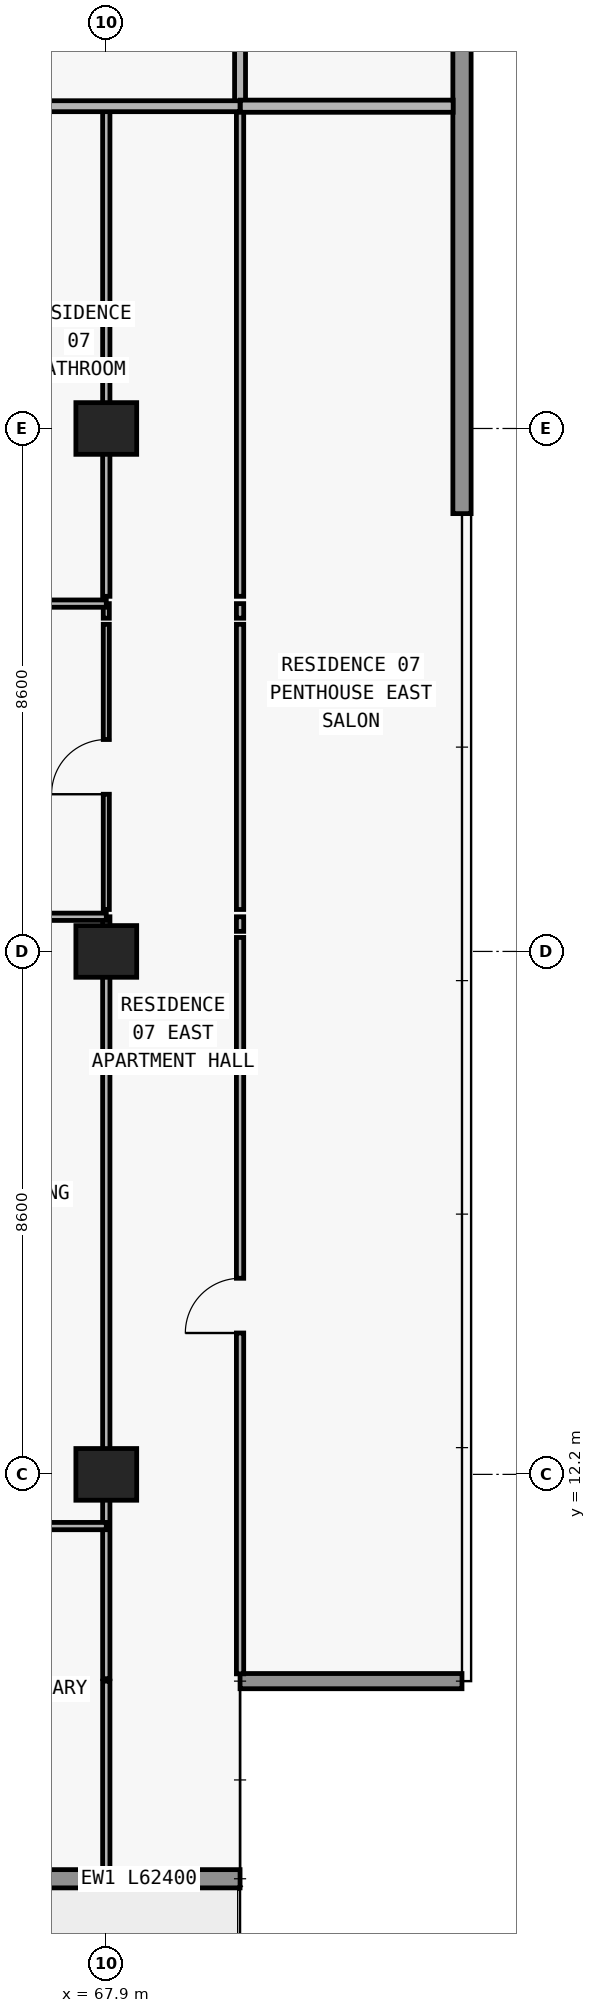
"""IFC4 building model, lengths in metres.
Left out: names, types, materials, properties, quantities, classifications, styles, units other than length and angle.
Written with IfcOpenShell. Run it as: python <this file> out.ifc"""

import sys

from ifc_helpers import new_model, si_unit, direction, frame, frame_2d, origin, origin_2d, place, context, subcontext, project, spatial, rectangle, extrude, element, fill, save


model = new_model("IFC4")
c1 = context("Model", 3, precision=1e-05, world=origin(), true_north=direction((0.0, 1.0)))
c2 = subcontext(c1, "Body", "Model", "MODEL_VIEW")
j1 = project(units=[si_unit("LENGTHUNIT", "METRE"), si_unit("PLANEANGLEUNIT", "RADIAN")], contexts=[c1])
p1 = place(None, origin())
s1 = spatial("IfcSite", under=j1, at=p1, CompositionType="ELEMENT")
p2 = place(p1, origin())
s2 = spatial("IfcBuilding", under=s1, at=p2, CompositionType="ELEMENT")
p3 = place(p2, frame((0.0, 0.0, 129.0)))
s3 = spatial("IfcBuildingStorey", under=s2, at=p3, CompositionType="ELEMENT", Elevation=129.0)
for number, where, z_axis, x_axis in (
    (1, (67.9, 12.2, 0.0), (0.0, 0.0, 1.0), (1.0, 0.0, 0.0)),
    (2, (67.9, 20.8, 0.0), (0.0, 0.0, 1.0), (1.0, 0.0, 0.0)),
    (3, (67.9, 29.4, 0.0), (0.0, 0.0, 1.0), (1.0, 0.0, 0.0)),
):
    element("IfcColumn", number, at=place(p3, frame(where, z_axis=z_axis, x_axis=x_axis)), inside=s3, PredefinedType="COLUMN", context=c2, shape_type="SweptSolid", body=[
        extrude(rectangle(XDim=1.0, YDim=0.85, at=origin_2d()), origin(), (0.0, 0.0, 1.0), 3.05),
    ])
p4 = place(p3, frame((70.1, 5.55, 0.0), z_axis=(0.0, 0.0, 1.0), x_axis=(-1.0, 0.0, 0.0)))
e4 = element("IfcWall", 4, at=p4, inside=s3, PredefinedType="STANDARD", context=c2, shape_type="SweptSolid", body=[
    extrude(rectangle(XDim=62.4, YDim=0.3, at=frame_2d((31.2, 0.0))), origin(), (0.0, 0.0, 1.0), 3.05),
])
p5 = place(p4, frame((57.226, 0.0, 0.0)))
e5 = element("IfcOpeningElement", 5, at=p5, cuts=e4, PredefinedType="OPENING", context=c2, shape_type="SweptSolid", body=[
    extrude(rectangle(XDim=2.0, YDim=2.3, at=frame_2d((1.0, 1.15))), frame((0.0, 0.16, 0.0), z_axis=(0.0, -1.0, 0.0), x_axis=(1.0, 0.0, 0.0)), (0.0, 0.0, 1.0), 0.32),
])
p6 = place(p4, frame((52.926, 0.0, 0.85)))
e6 = element("IfcOpeningElement", 6, at=p6, cuts=e4, PredefinedType="OPENING", context=c2, shape_type="SweptSolid", body=[
    extrude(rectangle(XDim=2.2, YDim=1.55, at=frame_2d((1.1, 0.775))), frame((0.0, 0.16, 0.0), z_axis=(0.0, -1.0, 0.0), x_axis=(1.0, 0.0, 0.0)), (0.0, 0.0, 1.0), 0.32),
])
p7 = place(p4, frame((48.49, 0.0, 0.0)))
e7 = element("IfcOpeningElement", 7, at=p7, cuts=e4, PredefinedType="OPENING", context=c2, shape_type="SweptSolid", body=[
    extrude(rectangle(XDim=2.0, YDim=2.3, at=frame_2d((1.0, 1.15))), frame((0.0, 0.16, 0.0), z_axis=(0.0, -1.0, 0.0), x_axis=(1.0, 0.0, 0.0)), (0.0, 0.0, 1.0), 0.32),
])
p8 = place(p4, frame((44.39, 0.0, 0.85)))
e8 = element("IfcOpeningElement", 8, at=p8, cuts=e4, PredefinedType="OPENING", context=c2, shape_type="SweptSolid", body=[
    extrude(rectangle(XDim=1.8, YDim=1.55, at=frame_2d((0.9, 0.775))), frame((0.0, 0.16, 0.0), z_axis=(0.0, -1.0, 0.0), x_axis=(1.0, 0.0, 0.0)), (0.0, 0.0, 1.0), 0.32),
])
p9 = place(p4, frame((40.426, 0.0, 0.0)))
e9 = element("IfcOpeningElement", 9, at=p9, cuts=e4, PredefinedType="OPENING", context=c2, shape_type="SweptSolid", body=[
    extrude(rectangle(XDim=2.0, YDim=2.3, at=frame_2d((1.0, 1.15))), frame((0.0, 0.16, 0.0), z_axis=(0.0, -1.0, 0.0), x_axis=(1.0, 0.0, 0.0)), (0.0, 0.0, 1.0), 0.32),
])
p10 = place(p4, frame((36.126, 0.0, 0.85)))
e10 = element("IfcOpeningElement", 10, at=p10, cuts=e4, PredefinedType="OPENING", context=c2, shape_type="SweptSolid", body=[
    extrude(rectangle(XDim=2.2, YDim=1.55, at=frame_2d((1.1, 0.775))), frame((0.0, 0.16, 0.0), z_axis=(0.0, -1.0, 0.0), x_axis=(1.0, 0.0, 0.0)), (0.0, 0.0, 1.0), 0.32),
])
p11 = place(p4, frame((31.91, 0.0, 0.0)))
e11 = element("IfcOpeningElement", 11, at=p11, cuts=e4, PredefinedType="OPENING", context=c2, shape_type="SweptSolid", body=[
    extrude(rectangle(XDim=2.0, YDim=2.3, at=frame_2d((1.0, 1.15))), frame((0.0, 0.16, 0.0), z_axis=(0.0, -1.0, 0.0), x_axis=(1.0, 0.0, 0.0)), (0.0, 0.0, 1.0), 0.32),
])
p12 = place(p4, frame((28.21, 0.0, 0.85)))
e12 = element("IfcOpeningElement", 12, at=p12, cuts=e4, PredefinedType="OPENING", context=c2, shape_type="SweptSolid", body=[
    extrude(rectangle(XDim=1.8, YDim=1.55, at=frame_2d((0.9, 0.775))), frame((0.0, 0.16, 0.0), z_axis=(0.0, -1.0, 0.0), x_axis=(1.0, 0.0, 0.0)), (0.0, 0.0, 1.0), 0.32),
])
p13 = place(p4, frame((24.426, 0.0, 0.0)))
e13 = element("IfcOpeningElement", 13, at=p13, cuts=e4, PredefinedType="OPENING", context=c2, shape_type="SweptSolid", body=[
    extrude(rectangle(XDim=2.0, YDim=2.3, at=frame_2d((1.0, 1.15))), frame((0.0, 0.16, 0.0), z_axis=(0.0, -1.0, 0.0), x_axis=(1.0, 0.0, 0.0)), (0.0, 0.0, 1.0), 0.32),
])
p14 = place(p4, frame((20.126, 0.0, 0.85)))
e14 = element("IfcOpeningElement", 14, at=p14, cuts=e4, PredefinedType="OPENING", context=c2, shape_type="SweptSolid", body=[
    extrude(rectangle(XDim=2.2, YDim=1.55, at=frame_2d((1.1, 0.775))), frame((0.0, 0.16, 0.0), z_axis=(0.0, -1.0, 0.0), x_axis=(1.0, 0.0, 0.0)), (0.0, 0.0, 1.0), 0.32),
])
p15 = place(p4, frame((15.69, 0.0, 0.0)))
e15 = element("IfcOpeningElement", 15, at=p15, cuts=e4, PredefinedType="OPENING", context=c2, shape_type="SweptSolid", body=[
    extrude(rectangle(XDim=2.0, YDim=2.3, at=frame_2d((1.0, 1.15))), frame((0.0, 0.16, 0.0), z_axis=(0.0, -1.0, 0.0), x_axis=(1.0, 0.0, 0.0)), (0.0, 0.0, 1.0), 0.32),
])
p16 = place(p4, frame((11.59, 0.0, 0.85)))
e16 = element("IfcOpeningElement", 16, at=p16, cuts=e4, PredefinedType="OPENING", context=c2, shape_type="SweptSolid", body=[
    extrude(rectangle(XDim=1.8, YDim=1.55, at=frame_2d((0.9, 0.775))), frame((0.0, 0.16, 0.0), z_axis=(0.0, -1.0, 0.0), x_axis=(1.0, 0.0, 0.0)), (0.0, 0.0, 1.0), 0.32),
])
p17 = place(p4, frame((7.626, 0.0, 0.0)))
e17 = element("IfcOpeningElement", 17, at=p17, cuts=e4, PredefinedType="OPENING", context=c2, shape_type="SweptSolid", body=[
    extrude(rectangle(XDim=2.0, YDim=2.3, at=frame_2d((1.0, 1.15))), frame((0.0, 0.16, 0.0), z_axis=(0.0, -1.0, 0.0), x_axis=(1.0, 0.0, 0.0)), (0.0, 0.0, 1.0), 0.32),
])
p18 = place(p4, frame((3.326, 0.0, 0.85)))
e18 = element("IfcOpeningElement", 18, at=p18, cuts=e4, PredefinedType="OPENING", context=c2, shape_type="SweptSolid", body=[
    extrude(rectangle(XDim=2.2, YDim=1.55, at=frame_2d((1.1, 0.775))), frame((0.0, 0.16, 0.0), z_axis=(0.0, -1.0, 0.0), x_axis=(1.0, 0.0, 0.0)), (0.0, 0.0, 1.0), 0.32),
])
p19 = place(p3, frame((70.1, 8.8, 0.0), z_axis=(0.0, 0.0, 1.0), x_axis=(1.0, 0.0, 0.0)))
e19 = element("IfcWall", 19, at=p19, inside=s3, PredefinedType="ELEMENTEDWALL", context=c2, shape_type="SweptSolid", body=[
    extrude(rectangle(XDim=3.65, YDim=0.25, at=frame_2d((1.825, 0.0))), origin(), (0.0, 0.0, 1.0), 3.05),
])
p20 = place(p3, frame((73.75, 47.2, 0.0), z_axis=(0.0, 0.0, 1.0), x_axis=(0.0, -1.0, 0.0)))
e20 = element("IfcWall", 20, at=p20, inside=s3, PredefinedType="STANDARD", context=c2, shape_type="SweptSolid", body=[
    extrude(rectangle(XDim=19.2, YDim=0.3, at=frame_2d((9.6, 0.0))), origin(), (0.0, 0.0, 1.0), 3.05),
])
p21 = place(p3, frame((67.9, 5.695, 0.0), z_axis=(0.0, 0.0, 1.0), x_axis=(0.0, 1.0, 0.0)))
e21 = element("IfcWall", 21, at=p21, inside=s3, PredefinedType="PARTITIONING", context=c2, shape_type="SweptSolid", body=[
    extrude(rectangle(XDim=3.105, YDim=0.12, at=frame_2d((1.552, 0.0))), origin(), (0.0, 0.0, 1.0), 3.05),
])
p22 = place(p3, frame((67.9, 8.84, 0.0), z_axis=(0.0, 0.0, 1.0), x_axis=(0.0, 1.0, 0.0)))
e22 = element("IfcWall", 22, at=p22, inside=s3, PredefinedType="PARTITIONING", context=c2, shape_type="SweptSolid", body=[
    extrude(rectangle(XDim=12.19, YDim=0.12, at=frame_2d((6.095, 0.0))), origin(), (0.0, 0.0, 1.0), 2.174),
])
p23 = place(p3, frame((67.9, 21.13, 0.0), z_axis=(0.0, 0.0, 1.0), x_axis=(0.0, 1.0, 0.0)))
e23 = element("IfcWall", 23, at=p23, inside=s3, PredefinedType="PARTITIONING", context=c2, shape_type="SweptSolid", body=[
    extrude(rectangle(XDim=0.24, YDim=0.12, at=frame_2d((0.12, 0.0))), origin(), (0.0, 0.0, 1.0), 2.174),
])
p24 = place(p3, frame((67.9, 21.49, 0.0), z_axis=(0.0, 0.0, 1.0), x_axis=(0.0, 1.0, 0.0)))
e24 = element("IfcWall", 24, at=p24, inside=s3, PredefinedType="MOVABLE", context=c2, shape_type="SweptSolid", body=[
    extrude(rectangle(XDim=4.69, YDim=0.1, at=frame_2d((2.345, 0.0))), origin(), (0.0, 0.0, 1.0), 2.174),
])
p25 = place(p24, frame((1.895, 0.0, 0.0)))
e25 = element("IfcOpeningElement", 25, at=p25, cuts=e24, PredefinedType="OPENING", context=c2, shape_type="SweptSolid", body=[
    extrude(rectangle(XDim=0.9, YDim=2.124, at=frame_2d((0.45, 1.062))), frame((0.0, 0.06, 0.0), z_axis=(0.0, -1.0, 0.0), x_axis=(1.0, 0.0, 0.0)), (0.0, 0.0, 1.0), 0.12),
])
p26 = place(p3, frame((67.9, 26.28, 0.0), z_axis=(0.0, 0.0, 1.0), x_axis=(0.0, 1.0, 0.0)))
e26 = element("IfcWall", 26, at=p26, inside=s3, PredefinedType="MOVABLE", context=c2, shape_type="SweptSolid", body=[
    extrude(rectangle(XDim=0.24, YDim=0.1, at=frame_2d((0.12, 0.0))), origin(), (0.0, 0.0, 1.0), 2.174),
])
p27 = place(p3, frame((67.9, 26.64, 0.0), z_axis=(0.0, 0.0, 1.0), x_axis=(0.0, 1.0, 0.0)))
e27 = element("IfcWall", 27, at=p27, inside=s3, PredefinedType="PARTITIONING", context=c2, shape_type="SweptSolid", body=[
    extrude(rectangle(XDim=8.06, YDim=0.12, at=frame_2d((4.03, 0.0))), origin(), (0.0, 0.0, 1.0), 2.174),
])
p28 = place(p3, frame((70.1, 8.92, 0.0), z_axis=(0.0, 0.0, 1.0), x_axis=(0.0, 1.0, 0.0)))
e28 = element("IfcWall", 28, at=p28, inside=s3, PredefinedType="PARTITIONING", context=c2, shape_type="SweptSolid", body=[
    extrude(rectangle(XDim=12.11, YDim=0.12, at=frame_2d((6.055, 0.0))), origin(), (0.0, 0.0, 1.0), 3.05),
])
p29 = place(p28, frame((5.605, 0.0, 0.0)))
e29 = element("IfcOpeningElement", 29, at=p29, cuts=e28, PredefinedType="OPENING", context=c2, shape_type="SweptSolid", body=[
    extrude(rectangle(XDim=0.9, YDim=2.15, at=frame_2d((0.45, 1.075))), frame((0.0, 0.07, 0.0), z_axis=(0.0, -1.0, 0.0), x_axis=(1.0, 0.0, 0.0)), (0.0, 0.0, 1.0), 0.14),
])
p30 = place(p3, frame((70.1, 21.13, 0.0), z_axis=(0.0, 0.0, 1.0), x_axis=(0.0, 1.0, 0.0)))
e30 = element("IfcWall", 30, at=p30, inside=s3, PredefinedType="PARTITIONING", context=c2, shape_type="SweptSolid", body=[
    extrude(rectangle(XDim=0.24, YDim=0.12, at=frame_2d((0.12, 0.0))), origin(), (0.0, 0.0, 1.0), 3.05),
])
p31 = place(p3, frame((70.1, 21.49, 0.0), z_axis=(0.0, 0.0, 1.0), x_axis=(0.0, 1.0, 0.0)))
e31 = element("IfcWall", 31, at=p31, inside=s3, PredefinedType="PARTITIONING", context=c2, shape_type="SweptSolid", body=[
    extrude(rectangle(XDim=4.69, YDim=0.12, at=frame_2d((2.345, 0.0))), origin(), (0.0, 0.0, 1.0), 3.05),
])
p32 = place(p3, frame((70.1, 26.28, 0.0), z_axis=(0.0, 0.0, 1.0), x_axis=(0.0, 1.0, 0.0)))
e32 = element("IfcWall", 32, at=p32, inside=s3, PredefinedType="PARTITIONING", context=c2, shape_type="SweptSolid", body=[
    extrude(rectangle(XDim=0.24, YDim=0.12, at=frame_2d((0.12, 0.0))), origin(), (0.0, 0.0, 1.0), 3.05),
])
p33 = place(p3, frame((70.1, 26.64, 0.0), z_axis=(0.0, 0.0, 1.0), x_axis=(0.0, 1.0, 0.0)))
e33 = element("IfcWall", 33, at=p33, inside=s3, PredefinedType="PARTITIONING", context=c2, shape_type="SweptSolid", body=[
    extrude(rectangle(XDim=8.06, YDim=0.12, at=frame_2d((4.03, 0.0))), origin(), (0.0, 0.0, 1.0), 3.05),
])
p34 = place(p3, frame((70.1, 34.705, 0.0), z_axis=(0.0, 0.0, 1.0), x_axis=(0.0, 1.0, 0.0)))
e34 = element("IfcWall", 34, at=p34, inside=s3, PredefinedType="PARTITIONING", context=c2, shape_type="SweptSolid", body=[
    extrude(rectangle(XDim=2.245, YDim=0.18, at=frame_2d((1.123, 0.0))), origin(), (0.0, 0.0, 1.0), 3.05),
])
p35 = place(p3, frame((63.448, 11.35, 0.0), z_axis=(0.0, 0.0, 1.0), x_axis=(1.0, 0.0, 0.0)))
e35 = element("IfcWall", 35, at=p35, inside=s3, PredefinedType="PARTITIONING", context=c2, shape_type="SweptSolid", body=[
    extrude(rectangle(XDim=4.452, YDim=0.12, at=frame_2d((2.226, 0.0))), origin(), (0.0, 0.0, 1.0), 3.05),
])
p36 = place(p35, frame((1.776, 0.0, 0.0)))
e36 = element("IfcOpeningElement", 36, at=p36, cuts=e35, PredefinedType="OPENING", context=c2, shape_type="SweptSolid", body=[
    extrude(rectangle(XDim=0.9, YDim=2.15, at=frame_2d((0.45, 1.075))), frame((0.0, 0.07, 0.0), z_axis=(0.0, -1.0, 0.0), x_axis=(1.0, 0.0, 0.0)), (0.0, 0.0, 1.0), 0.14),
])
p37 = place(p3, frame((59.55, 21.37, 0.0), z_axis=(0.0, 0.0, 1.0), x_axis=(1.0, 0.0, 0.0)))
e37 = element("IfcWall", 37, at=p37, inside=s3, PredefinedType="PARTITIONING", context=c2, shape_type="SweptSolid", body=[
    extrude(rectangle(XDim=8.35, YDim=0.12, at=frame_2d((4.175, 0.0))), origin(), (0.0, 0.0, 1.0), 3.05),
])
p38 = place(p37, frame((1.499, 0.0, 0.0)))
e38 = element("IfcOpeningElement", 38, at=p38, cuts=e37, PredefinedType="OPENING", context=c2, shape_type="SweptSolid", body=[
    extrude(rectangle(XDim=0.9, YDim=2.15, at=frame_2d((0.45, 1.075))), frame((0.0, 0.07, 0.0), z_axis=(0.0, -1.0, 0.0), x_axis=(1.0, 0.0, 0.0)), (0.0, 0.0, 1.0), 0.14),
])
p39 = place(p37, frame((6.093, 0.0, 0.0)))
e39 = element("IfcOpeningElement", 39, at=p39, cuts=e37, PredefinedType="OPENING", context=c2, shape_type="SweptSolid", body=[
    extrude(rectangle(XDim=0.9, YDim=2.15, at=frame_2d((0.45, 1.075))), frame((0.0, 0.07, 0.0), z_axis=(0.0, -1.0, 0.0), x_axis=(1.0, 0.0, 0.0)), (0.0, 0.0, 1.0), 0.14),
])
p40 = place(p3, frame((59.55, 26.52, 0.0), z_axis=(0.0, 0.0, 1.0), x_axis=(1.0, 0.0, 0.0)))
e40 = element("IfcWall", 40, at=p40, inside=s3, PredefinedType="PARTITIONING", context=c2, shape_type="SweptSolid", body=[
    extrude(rectangle(XDim=8.35, YDim=0.12, at=frame_2d((4.175, 0.0))), origin(), (0.0, 0.0, 1.0), 3.05),
])
p41 = place(p40, frame((1.918, 0.0, 0.0)))
e41 = element("IfcOpeningElement", 41, at=p41, cuts=e40, PredefinedType="OPENING", context=c2, shape_type="SweptSolid", body=[
    extrude(rectangle(XDim=0.9, YDim=2.15, at=frame_2d((0.45, 1.075))), frame((0.0, 0.07, 0.0), z_axis=(0.0, -1.0, 0.0), x_axis=(1.0, 0.0, 0.0)), (0.0, 0.0, 1.0), 0.14),
])
p42 = place(p3, frame((59.55, 34.7, 0.0), z_axis=(0.0, 0.0, 1.0), x_axis=(1.0, 0.0, 0.0)))
e42 = element("IfcWall", 42, at=p42, inside=s3, PredefinedType="PARTITIONING", context=c2, shape_type="SweptSolid", body=[
    extrude(rectangle(XDim=10.55, YDim=0.18, at=frame_2d((5.275, 0.0))), origin(), (0.0, 0.0, 1.0), 3.05),
])
p43 = place(p42, frame((2.85, 0.0, 0.0)))
e43 = element("IfcOpeningElement", 43, at=p43, cuts=e42, PredefinedType="OPENING", context=c2, shape_type="SweptSolid", body=[
    extrude(rectangle(XDim=1.0, YDim=2.2, at=frame_2d((0.5, 1.1))), frame((0.0, 0.1, 0.0), z_axis=(0.0, -1.0, 0.0), x_axis=(1.0, 0.0, 0.0)), (0.0, 0.0, 1.0), 0.2),
])
p44 = place(p3, frame((70.105, 34.7, 0.0), z_axis=(0.0, 0.0, 1.0), x_axis=(1.0, 0.0, 0.0)))
e44 = element("IfcWall", 44, at=p44, inside=s3, PredefinedType="PARTITIONING", context=c2, shape_type="SweptSolid", body=[
    extrude(rectangle(XDim=3.5, YDim=0.2, at=frame_2d((1.75, 0.0))), origin(), (0.0, 0.0, 1.0), 3.05),
])
p45 = place(p25, origin())
e45 = element("IfcDoor", 45, at=p45, inside=s3, OperationType="SINGLE_SWING_LEFT", PredefinedType="DOOR", context=c2, shape_type="SweptSolid", body=[
    extrude(rectangle(XDim=0.9, YDim=2.124, at=frame_2d((0.45, 1.062))), frame((0.0, 0.025, 0.0), z_axis=(0.0, -1.0, 0.0), x_axis=(1.0, 0.0, 0.0)), (0.0, 0.0, 1.0), 0.05),
])
fill(e25, e45)
p46 = place(p29, origin())
e46 = element("IfcDoor", 46, at=p46, inside=s3, OperationType="SINGLE_SWING_LEFT", PredefinedType="DOOR", context=c2, shape_type="SweptSolid", body=[
    extrude(rectangle(XDim=0.9, YDim=2.15, at=frame_2d((0.45, 1.075))), frame((0.0, 0.025, 0.0), z_axis=(0.0, -1.0, 0.0), x_axis=(1.0, 0.0, 0.0)), (0.0, 0.0, 1.0), 0.05),
])
fill(e29, e46)
save(model, sys.argv[1])
